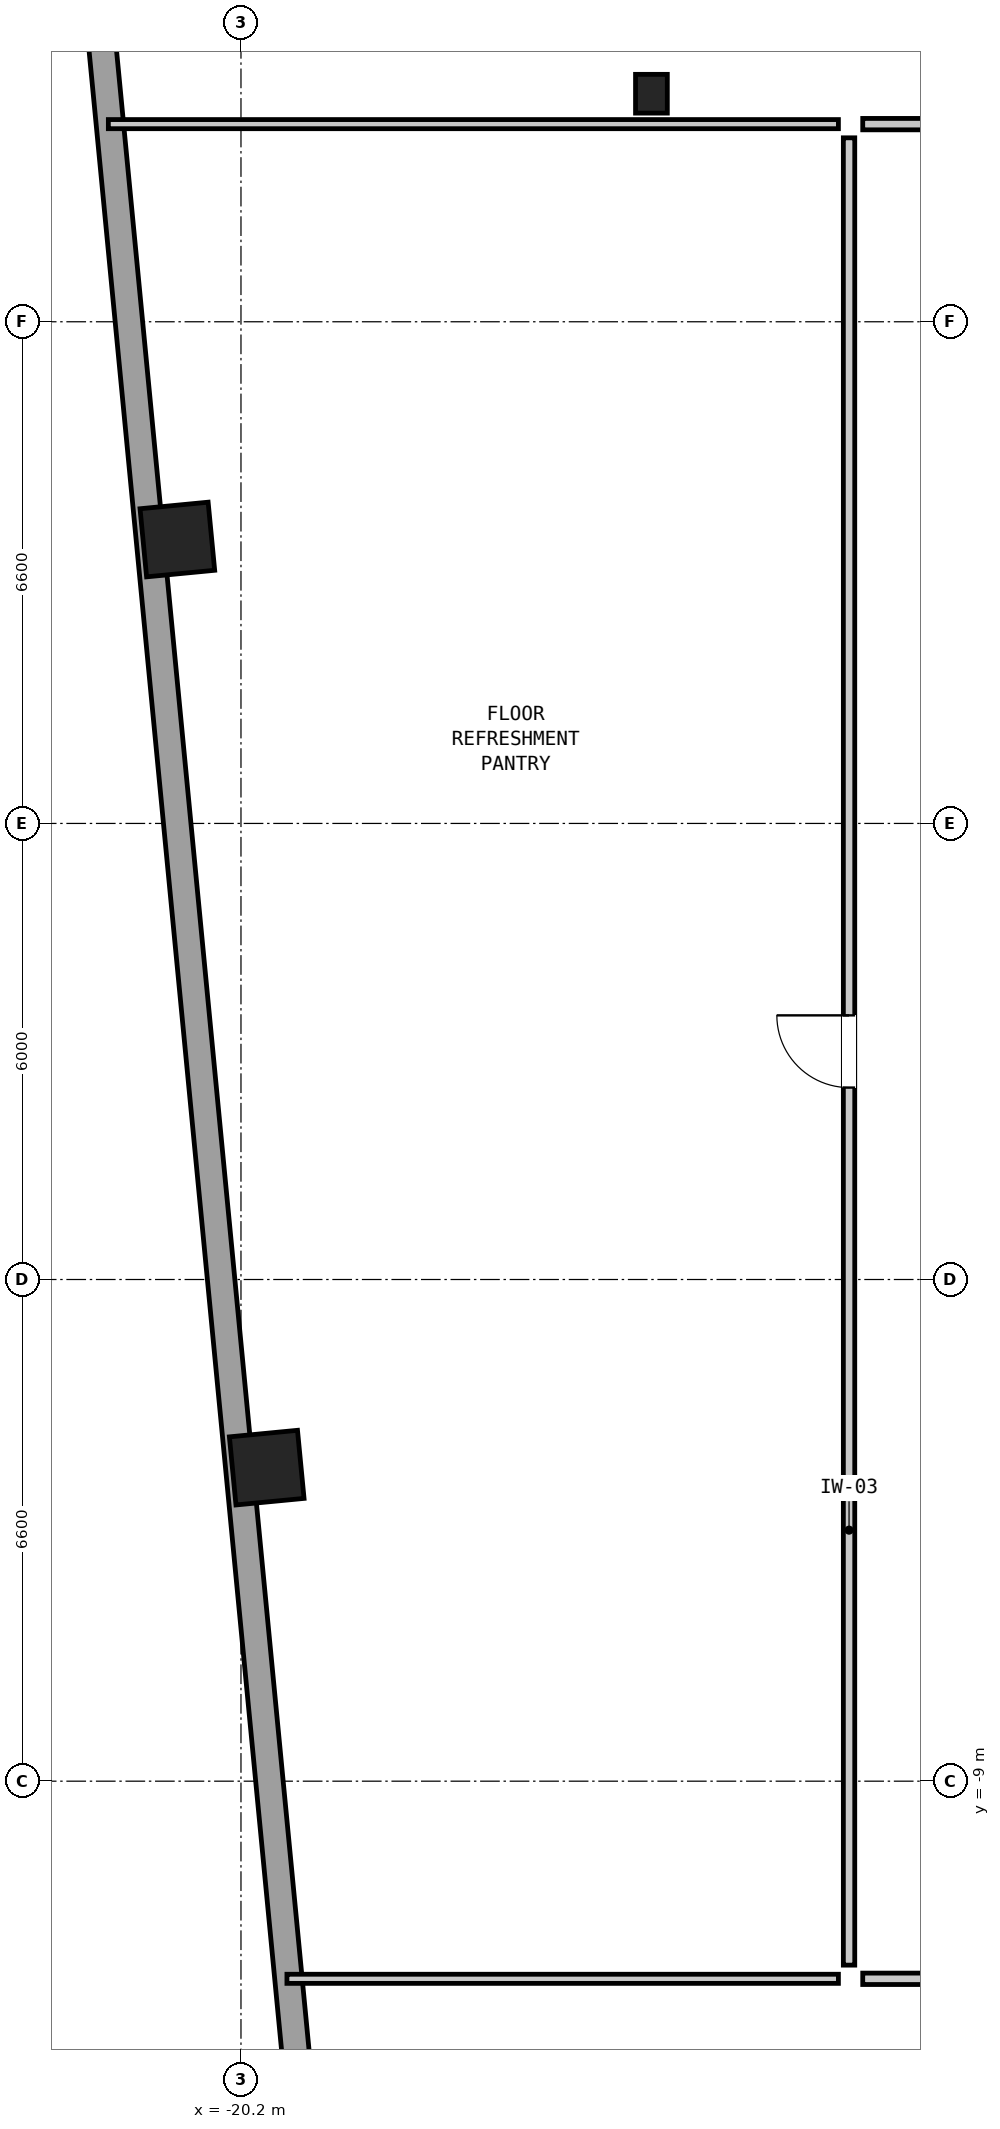
"""IFC4 building model, lengths in metres.
Left out: names, types, materials, properties, quantities, classifications, styles, units other than length and angle.
Written with IfcOpenShell. Run it as: python <this file> out.ifc"""

import sys

from ifc_helpers import new_model, si_unit, direction, frame, frame_2d, origin, origin_2d, place, context, subcontext, project, spatial, rectangle, hollow_rectangle, i_section, extrude, element, fill, save


model = new_model("IFC4")
c1 = context("Model", 3, precision=1e-05, world=origin(), true_north=direction((0.0, 1.0)))
c2 = subcontext(c1, "Body", "Model", "MODEL_VIEW")
j1 = project(units=[si_unit("LENGTHUNIT", "METRE"), si_unit("PLANEANGLEUNIT", "RADIAN")], contexts=[c1])
p1 = place(None, origin())
s1 = spatial("IfcSite", under=j1, at=p1, CompositionType="ELEMENT")
p2 = place(p1, origin())
s2 = spatial("IfcBuilding", under=s1, at=p2, CompositionType="ELEMENT")
p3 = place(p2, frame((0.0, 0.0, 69.45)))
s3 = spatial("IfcBuildingStorey", under=s2, at=p3, CompositionType="ELEMENT", Elevation=69.45)
for number, where, z_axis, x_axis in (
    (1, (-21.037, 7.335, 0.0), (0.0, 0.0, 1.0), (-0.096, 0.995, 0.0)),
    (2, (-19.861, -4.875, 0.0), (0.0, 0.0, 1.0), (-0.096, 0.995, 0.0)),
):
    element("IfcColumn", number, at=place(p3, frame(where, z_axis=z_axis, x_axis=x_axis)), inside=s3, PredefinedType="COLUMN", context=c2, shape_type="SweptSolid", body=[
        extrude(hollow_rectangle(XDim=0.9, YDim=0.9, WallThickness=0.055, at=origin_2d()), origin(), (0.0, 0.0, 1.0), 3.05),
    ])
p4 = place(p3, frame((-14.8, 13.2, 0.0), z_axis=(0.0, 0.0, 1.0), x_axis=(1.0, 0.0, 0.0)))
e3 = element("IfcColumn", 3, at=p4, inside=s3, PredefinedType="COLUMN", context=c2, shape_type="SweptSolid", body=[
    extrude(i_section(OverallWidth=0.418, OverallDepth=0.51, WebThickness=0.042, FlangeThickness=0.068, at=origin_2d()), origin(), (0.0, 0.0, 1.0), 3.05),
])
p5 = place(p3, frame((-19.086, -16.684, 0.0), z_axis=(0.0, 0.0, 1.0), x_axis=(-0.095851354731, 0.99539565892, 0.0)))
e4 = element("IfcWall", 4, at=p5, inside=s3, PredefinedType="SOLIDWALL", context=c2, shape_type="SweptSolid", body=[
    extrude(rectangle(XDim=35.924, YDim=0.36, at=frame_2d((17.962, 0.0))), origin(), (0.0, 0.0, 1.0), 0.48),
])
p6 = place(p3, frame((-21.945, 12.8, 0.0), z_axis=(0.0, 0.0, 1.0), x_axis=(1.0, 0.0, 0.0)))
e5 = element("IfcWall", 5, at=p6, inside=s3, PredefinedType="PARTITIONING", context=c2, shape_type="SweptSolid", body=[
    extrude(rectangle(XDim=9.605, YDim=0.12, at=frame_2d((4.802, 0.0))), origin(), (0.0, 0.0, 1.0), 2.83),
])
p7 = place(p3, frame((-19.595, -11.6, 0.0), z_axis=(0.0, 0.0, 1.0), x_axis=(1.0, 0.0, 0.0)))
e6 = element("IfcWall", 6, at=p7, inside=s3, PredefinedType="PARTITIONING", context=c2, shape_type="SweptSolid", body=[
    extrude(rectangle(XDim=7.255, YDim=0.12, at=frame_2d((3.628, 0.0))), origin(), (0.0, 0.0, 1.0), 2.274),
])
p8 = place(p3, frame((-12.02, 12.8, 0.0), z_axis=(0.0, 0.0, 1.0), x_axis=(1.0, 0.0, 0.0)))
e7 = element("IfcWall", 7, at=p8, inside=s3, PredefinedType="PARTITIONING", context=c2, shape_type="SweptSolid", body=[
    extrude(rectangle(XDim=8.94, YDim=0.15, at=frame_2d((4.47, 0.0))), origin(), (0.0, 0.0, 1.0), 2.83),
])
p9 = place(p8, frame((3.995, 0.0, 0.0)))
e8 = element("IfcOpeningElement", 8, at=p9, cuts=e7, PredefinedType="OPENING", context=c2, shape_type="SweptSolid", body=[
    extrude(rectangle(XDim=0.95, YDim=2.1, at=frame_2d((0.475, 1.05))), frame((0.0, 0.087, 0.0), z_axis=(0.0, -1.0, 0.0), x_axis=(1.0, 0.0, 0.0)), (0.0, 0.0, 1.0), 0.174),
])
p10 = place(p3, frame((-12.02, -11.6, 0.0), z_axis=(0.0, 0.0, 1.0), x_axis=(1.0, 0.0, 0.0)))
e9 = element("IfcWall", 9, at=p10, inside=s3, PredefinedType="PARTITIONING", context=c2, shape_type="SweptSolid", body=[
    extrude(rectangle(XDim=24.04, YDim=0.15, at=frame_2d((12.02, 0.0))), origin(), (0.0, 0.0, 1.0), 2.274),
])
p11 = place(p10, frame((11.545, 0.0, 0.0)))
e10 = element("IfcOpeningElement", 10, at=p11, cuts=e9, PredefinedType="OPENING", context=c2, shape_type="SweptSolid", body=[
    extrude(rectangle(XDim=0.95, YDim=2.1, at=frame_2d((0.475, 1.05))), frame((0.0, 0.087, 0.0), z_axis=(0.0, -1.0, 0.0), x_axis=(1.0, 0.0, 0.0)), (0.0, 0.0, 1.0), 0.174),
])
p12 = place(p3, frame((-12.2, -11.42, 0.0), z_axis=(0.0, 0.0, 1.0), x_axis=(0.0, 1.0, 0.0)))
e11 = element("IfcWall", 11, at=p12, inside=s3, PredefinedType="PARTITIONING", context=c2, shape_type="SweptSolid", body=[
    extrude(rectangle(XDim=24.04, YDim=0.15, at=frame_2d((12.02, 0.0))), origin(), (0.0, 0.0, 1.0), 2.83),
])
p13 = place(p12, frame((11.545, 0.0, 0.0)))
e12 = element("IfcOpeningElement", 12, at=p13, cuts=e11, PredefinedType="OPENING", context=c2, shape_type="SweptSolid", body=[
    extrude(rectangle(XDim=0.95, YDim=2.1, at=frame_2d((0.475, 1.05))), frame((0.0, 0.087, 0.0), z_axis=(0.0, -1.0, 0.0), x_axis=(1.0, 0.0, 0.0)), (0.0, 0.0, 1.0), 0.174),
])
p14 = place(p13, origin())
e13 = element("IfcDoor", 13, at=p14, inside=s3, OperationType="SINGLE_SWING_RIGHT", PredefinedType="DOOR", context=c2, shape_type="SweptSolid", body=[
    extrude(rectangle(XDim=0.95, YDim=2.1, at=frame_2d((0.475, 1.05))), frame((0.0, 0.025, 0.0), z_axis=(0.0, -1.0, 0.0), x_axis=(1.0, 0.0, 0.0)), (0.0, 0.0, 1.0), 0.05),
])
fill(e12, e13)
save(model, sys.argv[1])
